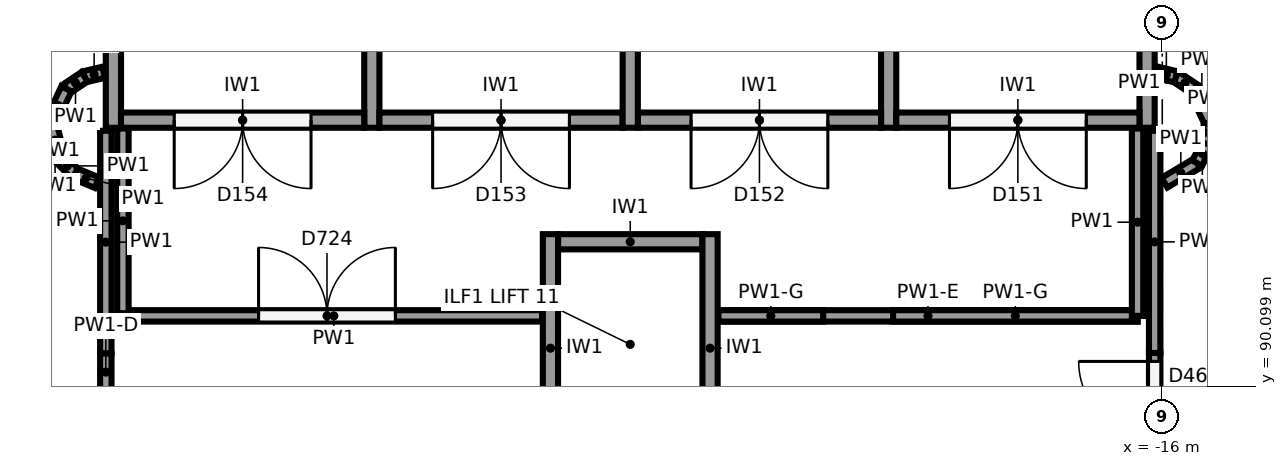
"""IFC4 building model, lengths in metres.
Left out: names, types, materials, properties, quantities, classifications, styles, units other than length and angle.
Written with IfcOpenShell. Run it as: python <this file> out.ifc"""

import sys

from ifc_helpers import new_model, si_unit, direction, frame, frame_2d, origin, origin_2d, place, context, subcontext, project, spatial, rectangle, circle, extrude, element, fill, save


model = new_model("IFC4")
c1 = context("Model", 3, precision=1e-05, world=origin(), true_north=direction((0.0, 1.0)))
c2 = subcontext(c1, "Body", "Model", "MODEL_VIEW")
j1 = project(units=[si_unit("LENGTHUNIT", "METRE"), si_unit("PLANEANGLEUNIT", "RADIAN")], contexts=[c1])
p1 = place(None, origin())
s1 = spatial("IfcSite", under=j1, at=p1, CompositionType="ELEMENT")
p2 = place(p1, origin())
s2 = spatial("IfcBuilding", under=s1, at=p2, CompositionType="ELEMENT")
p3 = place(p2, frame((0.0, 0.0, -4.0)))
s3 = spatial("IfcBuildingStorey", under=s2, at=p3, CompositionType="ELEMENT", Elevation=-4.0)
p4 = place(p3, frame((-19.627, 89.904, -1.2), z_axis=(0.0, 0.0, 1.0), x_axis=(1.0, 0.0, 0.0)))
e1 = element("IfcColumn", 1, at=p4, inside=s3, PredefinedType="COLUMN", context=c2, shape_type="SweptSolid", body=[
    extrude(circle(Radius=0.55, at=origin_2d()), origin(), (0.0, 0.0, 1.0), 5.2),
])
for number, where, z_axis, x_axis in (
    (2, (-16.2, 102.3, -1.2), (0.0, 0.0, 1.0), (0.0, -1.0, 0.0)),
    (3, (-23.0, 102.3, -1.2), (0.0, 0.0, 1.0), (0.0, -1.0, 0.0)),
    (4, (-29.8, 102.3, -1.2), (0.0, 0.0, 1.0), (0.0, -1.0, 0.0)),
    (5, (-19.6, 102.3, -1.2), (0.0, 0.0, 1.0), (0.0, -1.0, 0.0)),
    (6, (-26.4, 102.3, -1.2), (0.0, 0.0, 1.0), (0.0, -1.0, 0.0)),
):
    element("IfcWall", number, at=place(p3, frame(where, z_axis=z_axis, x_axis=x_axis)), inside=s3, PredefinedType="SHEAR", context=c2, shape_type="SweptSolid", body=[
        extrude(rectangle(XDim=8.8, YDim=0.2, at=frame_2d((4.4, 0.0))), origin(), (0.0, 0.0, 1.0), 4.8),
    ])
p5 = place(p3, frame((-16.3, 93.6, -1.2), z_axis=(0.0, 0.0, 1.0), x_axis=(-1.0, 0.0, 0.0)))
e7 = element("IfcWall", 7, at=p5, inside=s3, PredefinedType="SHEAR", context=c2, shape_type="SweptSolid", body=[
    extrude(rectangle(XDim=3.2, YDim=0.2, at=frame_2d((1.6, 0.0))), origin(), (0.0, 0.0, 1.0), 4.8),
])
p6 = place(p5, frame((0.7, 0.0, 1.2)))
e8 = element("IfcOpeningElement", 8, at=p6, cuts=e7, PredefinedType="OPENING", context=c2, shape_type="SweptSolid", body=[
    extrude(rectangle(XDim=1.8, YDim=2.1, at=frame_2d((0.9, 1.05))), frame((0.0, 0.11, 0.0), z_axis=(0.0, -1.0, 0.0), x_axis=(1.0, 0.0, 0.0)), (0.0, 0.0, 1.0), 0.22),
])
p7 = place(p3, frame((-19.7, 93.6, -1.2), z_axis=(0.0, 0.0, 1.0), x_axis=(-1.0, 0.0, 0.0)))
e9 = element("IfcWall", 9, at=p7, inside=s3, PredefinedType="SHEAR", context=c2, shape_type="SweptSolid", body=[
    extrude(rectangle(XDim=3.2, YDim=0.2, at=frame_2d((1.6, 0.0))), origin(), (0.0, 0.0, 1.0), 4.8),
])
p8 = place(p7, frame((0.7, 0.0, 1.2)))
e10 = element("IfcOpeningElement", 10, at=p8, cuts=e9, PredefinedType="OPENING", context=c2, shape_type="SweptSolid", body=[
    extrude(rectangle(XDim=1.8, YDim=2.1, at=frame_2d((0.9, 1.05))), frame((0.0, 0.11, 0.0), z_axis=(0.0, -1.0, 0.0), x_axis=(1.0, 0.0, 0.0)), (0.0, 0.0, 1.0), 0.22),
])
p9 = place(p3, frame((-23.1, 93.6, -1.2), z_axis=(0.0, 0.0, 1.0), x_axis=(-1.0, 0.0, 0.0)))
e11 = element("IfcWall", 11, at=p9, inside=s3, PredefinedType="SHEAR", context=c2, shape_type="SweptSolid", body=[
    extrude(rectangle(XDim=3.2, YDim=0.2, at=frame_2d((1.6, 0.0))), origin(), (0.0, 0.0, 1.0), 4.8),
])
p10 = place(p9, frame((0.7, 0.0, 1.2)))
e12 = element("IfcOpeningElement", 12, at=p10, cuts=e11, PredefinedType="OPENING", context=c2, shape_type="SweptSolid", body=[
    extrude(rectangle(XDim=1.8, YDim=2.1, at=frame_2d((0.9, 1.05))), frame((0.0, 0.11, 0.0), z_axis=(0.0, -1.0, 0.0), x_axis=(1.0, 0.0, 0.0)), (0.0, 0.0, 1.0), 0.22),
])
p11 = place(p3, frame((-26.5, 93.6, -1.2), z_axis=(0.0, 0.0, 1.0), x_axis=(-1.0, 0.0, 0.0)))
e13 = element("IfcWall", 13, at=p11, inside=s3, PredefinedType="SHEAR", context=c2, shape_type="SweptSolid", body=[
    extrude(rectangle(XDim=3.2, YDim=0.2, at=frame_2d((1.6, 0.0))), origin(), (0.0, 0.0, 1.0), 4.8),
])
p12 = place(p11, frame((0.7, 0.0, 1.2)))
e14 = element("IfcOpeningElement", 14, at=p12, cuts=e13, PredefinedType="OPENING", context=c2, shape_type="SweptSolid", body=[
    extrude(rectangle(XDim=1.8, YDim=2.1, at=frame_2d((0.9, 1.05))), frame((0.0, 0.11, 0.0), z_axis=(0.0, -1.0, 0.0), x_axis=(1.0, 0.0, 0.0)), (0.0, 0.0, 1.0), 0.22),
])
for number, where, z_axis, x_axis in (
    (15, (-21.95, 92.1, -1.2), (0.0, 0.0, 1.0), (0.0, -1.0, 0.0)),
    (16, (-24.05, 92.1, -1.2), (0.0, 0.0, 1.0), (0.0, -1.0, 0.0)),
):
    element("IfcWall", number, at=place(p3, frame(where, z_axis=z_axis, x_axis=x_axis)), inside=s3, PredefinedType="SHEAR", context=c2, shape_type="SweptSolid", body=[
        extrude(rectangle(XDim=3.0, YDim=0.2, at=frame_2d((1.5, 0.0))), origin(), (0.0, 0.0, 1.0), 4.8),
    ])
p13 = place(p3, frame((-22.05, 92.0, -1.2), z_axis=(0.0, 0.0, 1.0), x_axis=(-1.0, 0.0, 0.0)))
e17 = element("IfcWall", 17, at=p13, inside=s3, PredefinedType="SHEAR", context=c2, shape_type="SweptSolid", body=[
    extrude(rectangle(XDim=1.9, YDim=0.2, at=frame_2d((0.95, 0.0))), origin(), (0.0, 0.0, 1.0), 4.8),
])
p14 = place(p3, frame((-16.1, 89.076, 0.0), z_axis=(0.0, 0.0, 1.0), x_axis=(0.0, 1.0, 0.0)))
e18 = element("IfcWall", 18, at=p14, inside=s3, PredefinedType="PARTITIONING", context=c2, shape_type="SweptSolid", body=[
    extrude(rectangle(XDim=1.461, YDim=0.15, at=frame_2d((0.731, 0.0))), origin(), (0.0, 0.0, 1.0), 2.3),
])
p15 = place(p14, frame((0.35, 0.0, 0.0)))
e19 = element("IfcOpeningElement", 19, at=p15, cuts=e18, PredefinedType="OPENING", context=c2, shape_type="SweptSolid", body=[
    extrude(rectangle(XDim=1.0, YDim=2.1, at=frame_2d((0.5, 1.05))), frame((0.0, 0.085, 0.0), z_axis=(0.0, -1.0, 0.0), x_axis=(1.0, 0.0, 0.0)), (0.0, 0.0, 1.0), 0.17),
])
p16 = place(p3, frame((-16.1, 90.537, 0.0), z_axis=(0.0, 0.0, 1.0), x_axis=(0.0, 1.0, 0.0)))
e20 = element("IfcWall", 20, at=p16, inside=s3, PredefinedType="PARTITIONING", context=c2, shape_type="SweptSolid", body=[
    extrude(rectangle(XDim=2.923, YDim=0.15, at=frame_2d((1.461, 0.0))), origin(), (0.0, 0.0, 1.0), 3.6),
])
p17 = place(p3, frame((-29.9, 93.46, 0.0), z_axis=(0.0, 0.0, 1.0), x_axis=(0.0, -1.0, 0.0)))
e21 = element("IfcWall", 21, at=p17, inside=s3, PredefinedType="PARTITIONING", context=c2, shape_type="SweptSolid", body=[
    extrude(rectangle(XDim=2.93, YDim=0.15, at=frame_2d((1.465, 0.0))), origin(), (0.0, 0.0, 1.0), 3.6),
])
p18 = place(p3, frame((-29.9, 90.53, 0.0), z_axis=(0.0, 0.0, 1.0), x_axis=(0.0, -1.0, 0.0)))
e22 = element("IfcWall", 22, at=p18, inside=s3, PredefinedType="PARTITIONING", context=c2, shape_type="SweptSolid", body=[
    extrude(rectangle(XDim=0.489, YDim=0.15, at=frame_2d((0.244, 0.0))), origin(), (0.0, 0.0, 1.0), 2.3),
])
p19 = place(p3, frame((-29.64, 91.025, 0.0), z_axis=(0.0, 0.0, 1.0), x_axis=(1.0, 0.0, 0.0)))
e23 = element("IfcWall", 23, at=p19, inside=s3, PredefinedType="PARTITIONING", context=c2, shape_type="SweptSolid", body=[
    extrude(rectangle(XDim=5.48, YDim=0.15, at=frame_2d((2.74, 0.0))), origin(), (0.0, 0.0, 1.0), 3.6),
])
p20 = place(p19, frame((1.75, 0.0, 0.0)))
e24 = element("IfcOpeningElement", 24, at=p20, cuts=e23, PredefinedType="OPENING", context=c2, shape_type="SweptSolid", body=[
    extrude(rectangle(XDim=1.8, YDim=2.1, at=frame_2d((0.9, 1.05))), frame((0.0, 0.085, 0.0), z_axis=(0.0, -1.0, 0.0), x_axis=(1.0, 0.0, 0.0)), (0.0, 0.0, 1.0), 0.17),
])
p21 = place(p3, frame((-21.84, 91.025, 0.0), z_axis=(0.0, 0.0, 1.0), x_axis=(1.0, 0.0, 0.0)))
e25 = element("IfcWall", 25, at=p21, inside=s3, PredefinedType="PARTITIONING", context=c2, shape_type="SweptSolid", body=[
    extrude(rectangle(XDim=5.515, YDim=0.15, at=frame_2d((2.758, 0.0))), origin(), (0.0, 0.0, 1.0), 2.85),
])
p22 = place(p3, frame((-21.84, 91.025, 2.85), z_axis=(0.0, 0.0, 1.0), x_axis=(1.0, 0.0, 0.0)))
e26 = element("IfcWall", 26, at=p22, inside=s3, PredefinedType="PARTITIONING", context=c2, shape_type="SweptSolid", body=[
    extrude(rectangle(XDim=1.379, YDim=0.15, at=frame_2d((0.689, 0.0))), origin(), (0.0, 0.0, 1.0), 0.75),
])
p23 = place(p3, frame((-19.542, 91.025, 2.85), z_axis=(0.0, 0.0, 1.0), x_axis=(1.0, 0.0, 0.0)))
e27 = element("IfcWall", 27, at=p23, inside=s3, PredefinedType="PARTITIONING", context=c2, shape_type="SweptSolid", body=[
    extrude(rectangle(XDim=3.217, YDim=0.15, at=frame_2d((1.608, 0.0))), origin(), (0.0, 0.0, 1.0), 0.75),
])
p24 = place(p3, frame((-16.325, 91.025, 0.0), z_axis=(0.0, 0.0, 1.0), x_axis=(0.0, 1.0, 0.0)))
e28 = element("IfcWall", 28, at=p24, inside=s3, PredefinedType="PARTITIONING", context=c2, shape_type="SweptSolid", body=[
    extrude(rectangle(XDim=2.465, YDim=0.15, at=frame_2d((1.232, 0.0))), origin(), (0.0, 0.0, 1.0), 3.6),
])
p25 = place(p3, frame((-29.675, 93.49, 0.0), z_axis=(0.0, 0.0, 1.0), x_axis=(0.0, -1.0, 0.0)))
e29 = element("IfcWall", 29, at=p25, inside=s3, PredefinedType="PARTITIONING", context=c2, shape_type="SweptSolid", body=[
    extrude(rectangle(XDim=2.43, YDim=0.15, at=frame_2d((1.215, 0.0))), origin(), (0.0, 0.0, 1.0), 3.6),
])
p26 = place(p3, frame((-15.971, 92.777, 0.0), z_axis=(0.0, 0.0, 1.0), x_axis=(0.85856712863, 0.512701166017, 0.0)))
e30 = element("IfcWall", 30, at=p26, inside=s3, PredefinedType="PARTITIONING", context=c2, shape_type="SweptSolid", body=[
    extrude(rectangle(XDim=0.5, YDim=0.15, at=frame_2d((0.25, 0.0))), origin(), (0.0, 0.0, 1.0), 3.6),
])
p27 = place(p3, frame((-15.541, 93.034, 0.0), z_axis=(0.0, 0.0, 1.0), x_axis=(0.471682765858, 0.881768319, 0.0)))
e31 = element("IfcWall", 31, at=p27, inside=s3, PredefinedType="PARTITIONING", context=c2, shape_type="SweptSolid", body=[
    extrude(rectangle(XDim=0.289, YDim=0.15, at=frame_2d((0.145, 0.0))), origin(), (0.0, 0.0, 1.0), 3.6),
])
p28 = place(p3, frame((-15.405, 93.289, 0.0), z_axis=(0.0, 0.0, 1.0), x_axis=(0.0978334953, 0.99520279702, 0.0)))
e32 = element("IfcWall", 32, at=p28, inside=s3, PredefinedType="PARTITIONING", context=c2, shape_type="SweptSolid", body=[
    extrude(rectangle(XDim=0.29, YDim=0.15, at=frame_2d((0.145, 0.0))), origin(), (0.0, 0.0, 1.0), 3.6),
])
p29 = place(p3, frame((-15.376, 93.577, 0.0), z_axis=(0.0, 0.0, 1.0), x_axis=(-0.427757963167, 0.903893315025, 0.0)))
e33 = element("IfcWall", 33, at=p29, inside=s3, PredefinedType="PARTITIONING", context=c2, shape_type="SweptSolid", body=[
    extrude(rectangle(XDim=0.479, YDim=0.15, at=frame_2d((0.24, 0.0))), origin(), (0.0, 0.0, 1.0), 3.6),
])
p30 = place(p3, frame((-15.582, 94.01, 0.0), z_axis=(0.0, 0.0, 1.0), x_axis=(-0.831397130511, 0.555678694372, 0.0)))
e34 = element("IfcWall", 34, at=p30, inside=s3, PredefinedType="PARTITIONING", context=c2, shape_type="SweptSolid", body=[
    extrude(rectangle(XDim=0.288, YDim=0.15, at=frame_2d((0.144, 0.0))), origin(), (0.0, 0.0, 1.0), 3.6),
])
for number, where, z_axis, x_axis in (
    (35, (-15.821, 94.17, 0.0), (0.0, 0.0, 1.0), (-0.973, 0.23, 0.0)),
    (36, (-29.928, 94.23, 0.0), (0.0, 0.0, 1.0), (-0.973, -0.23, 0.0)),
):
    element("IfcWall", number, at=place(p3, frame(where, z_axis=z_axis, x_axis=x_axis)), inside=s3, PredefinedType="PARTITIONING", context=c2, shape_type="SweptSolid", body=[
        extrude(rectangle(XDim=0.258, YDim=0.15, at=frame_2d((0.129, 0.0))), origin(), (0.0, 0.0, 1.0), 3.6),
    ])
p31 = place(p3, frame((-30.179, 94.17, 0.0), z_axis=(0.0, 0.0, 1.0), x_axis=(-0.831397130511, -0.555678694372, 0.0)))
e37 = element("IfcWall", 37, at=p31, inside=s3, PredefinedType="PARTITIONING", context=c2, shape_type="SweptSolid", body=[
    extrude(rectangle(XDim=0.288, YDim=0.15, at=frame_2d((0.144, 0.0))), origin(), (0.0, 0.0, 1.0), 3.6),
])
for number, where, z_axis, x_axis in (
    (38, (-30.418, 94.01, 0.0), (0.0, 0.0, 1.0), (-0.428, -0.904, 0.0)),
    (39, (-30.626, 93.572, 0.0), (0.0, 0.0, 1.0), (0.243, -0.97, 0.0)),
):
    element("IfcWall", number, at=place(p3, frame(where, z_axis=z_axis, x_axis=x_axis)), inside=s3, PredefinedType="PARTITIONING", context=c2, shape_type="SweptSolid", body=[
        extrude(rectangle(XDim=0.486, YDim=0.15, at=frame_2d((0.243, 0.0))), origin(), (0.0, 0.0, 1.0), 3.6),
    ])
p32 = place(p3, frame((-30.508, 93.101, 0.0), z_axis=(0.0, 0.0, 1.0), x_axis=(0.707106781187, -0.707106781187, 0.0)))
e40 = element("IfcWall", 40, at=p32, inside=s3, PredefinedType="PARTITIONING", context=c2, shape_type="SweptSolid", body=[
    extrude(rectangle(XDim=0.289, YDim=0.15, at=frame_2d((0.145, 0.0))), origin(), (0.0, 0.0, 1.0), 3.6),
])
p33 = place(p3, frame((-30.304, 92.896, 0.0), z_axis=(0.0, 0.0, 1.0), x_axis=(0.923823997436, -0.38281747839, 0.0)))
e41 = element("IfcWall", 41, at=p33, inside=s3, PredefinedType="PARTITIONING", context=c2, shape_type="SweptSolid", body=[
    extrude(rectangle(XDim=0.309, YDim=0.15, at=frame_2d((0.154, 0.0))), origin(), (0.0, 0.0, 1.0), 3.6),
])
p34 = place(p6, origin())
e42 = element("IfcDoor", 42, at=p34, inside=s3, OperationType="DOUBLE_DOOR_SINGLE_SWING", PredefinedType="DOOR", context=c2, shape_type="SweptSolid", body=[
    extrude(rectangle(XDim=1.8, YDim=2.1, at=frame_2d((0.9, 1.05))), frame((0.0, 0.025, 0.0), z_axis=(0.0, -1.0, 0.0), x_axis=(1.0, 0.0, 0.0)), (0.0, 0.0, 1.0), 0.05),
])
fill(e8, e42)
p35 = place(p8, origin())
e43 = element("IfcDoor", 43, at=p35, inside=s3, OperationType="DOUBLE_DOOR_SINGLE_SWING", PredefinedType="DOOR", context=c2, shape_type="SweptSolid", body=[
    extrude(rectangle(XDim=1.8, YDim=2.1, at=frame_2d((0.9, 1.05))), frame((0.0, 0.025, 0.0), z_axis=(0.0, -1.0, 0.0), x_axis=(1.0, 0.0, 0.0)), (0.0, 0.0, 1.0), 0.05),
])
fill(e10, e43)
p36 = place(p10, origin())
e44 = element("IfcDoor", 44, at=p36, inside=s3, OperationType="DOUBLE_DOOR_SINGLE_SWING", PredefinedType="DOOR", context=c2, shape_type="SweptSolid", body=[
    extrude(rectangle(XDim=1.8, YDim=2.1, at=frame_2d((0.9, 1.05))), frame((0.0, 0.025, 0.0), z_axis=(0.0, -1.0, 0.0), x_axis=(1.0, 0.0, 0.0)), (0.0, 0.0, 1.0), 0.05),
])
fill(e12, e44)
p37 = place(p12, origin())
e45 = element("IfcDoor", 45, at=p37, inside=s3, OperationType="DOUBLE_DOOR_SINGLE_SWING", PredefinedType="DOOR", context=c2, shape_type="SweptSolid", body=[
    extrude(rectangle(XDim=1.8, YDim=2.1, at=frame_2d((0.9, 1.05))), frame((0.0, 0.025, 0.0), z_axis=(0.0, -1.0, 0.0), x_axis=(1.0, 0.0, 0.0)), (0.0, 0.0, 1.0), 0.05),
])
fill(e14, e45)
p38 = place(p15, origin())
e46 = element("IfcDoor", 46, at=p38, inside=s3, OperationType="SINGLE_SWING_RIGHT", PredefinedType="DOOR", context=c2, shape_type="SweptSolid", body=[
    extrude(rectangle(XDim=1.0, YDim=2.1, at=frame_2d((0.5, 1.05))), frame((0.0, 0.025, 0.0), z_axis=(0.0, -1.0, 0.0), x_axis=(1.0, 0.0, 0.0)), (0.0, 0.0, 1.0), 0.05),
])
fill(e19, e46)
p39 = place(p20, origin())
e47 = element("IfcDoor", 47, at=p39, inside=s3, OperationType="DOUBLE_DOOR_SINGLE_SWING", PredefinedType="DOOR", context=c2, shape_type="SweptSolid", body=[
    extrude(rectangle(XDim=1.8, YDim=2.1, at=frame_2d((0.9, 1.05))), frame((0.0, 0.025, 0.0), z_axis=(0.0, -1.0, 0.0), x_axis=(1.0, 0.0, 0.0)), (0.0, 0.0, 1.0), 0.05),
])
fill(e24, e47)
save(model, sys.argv[1])
